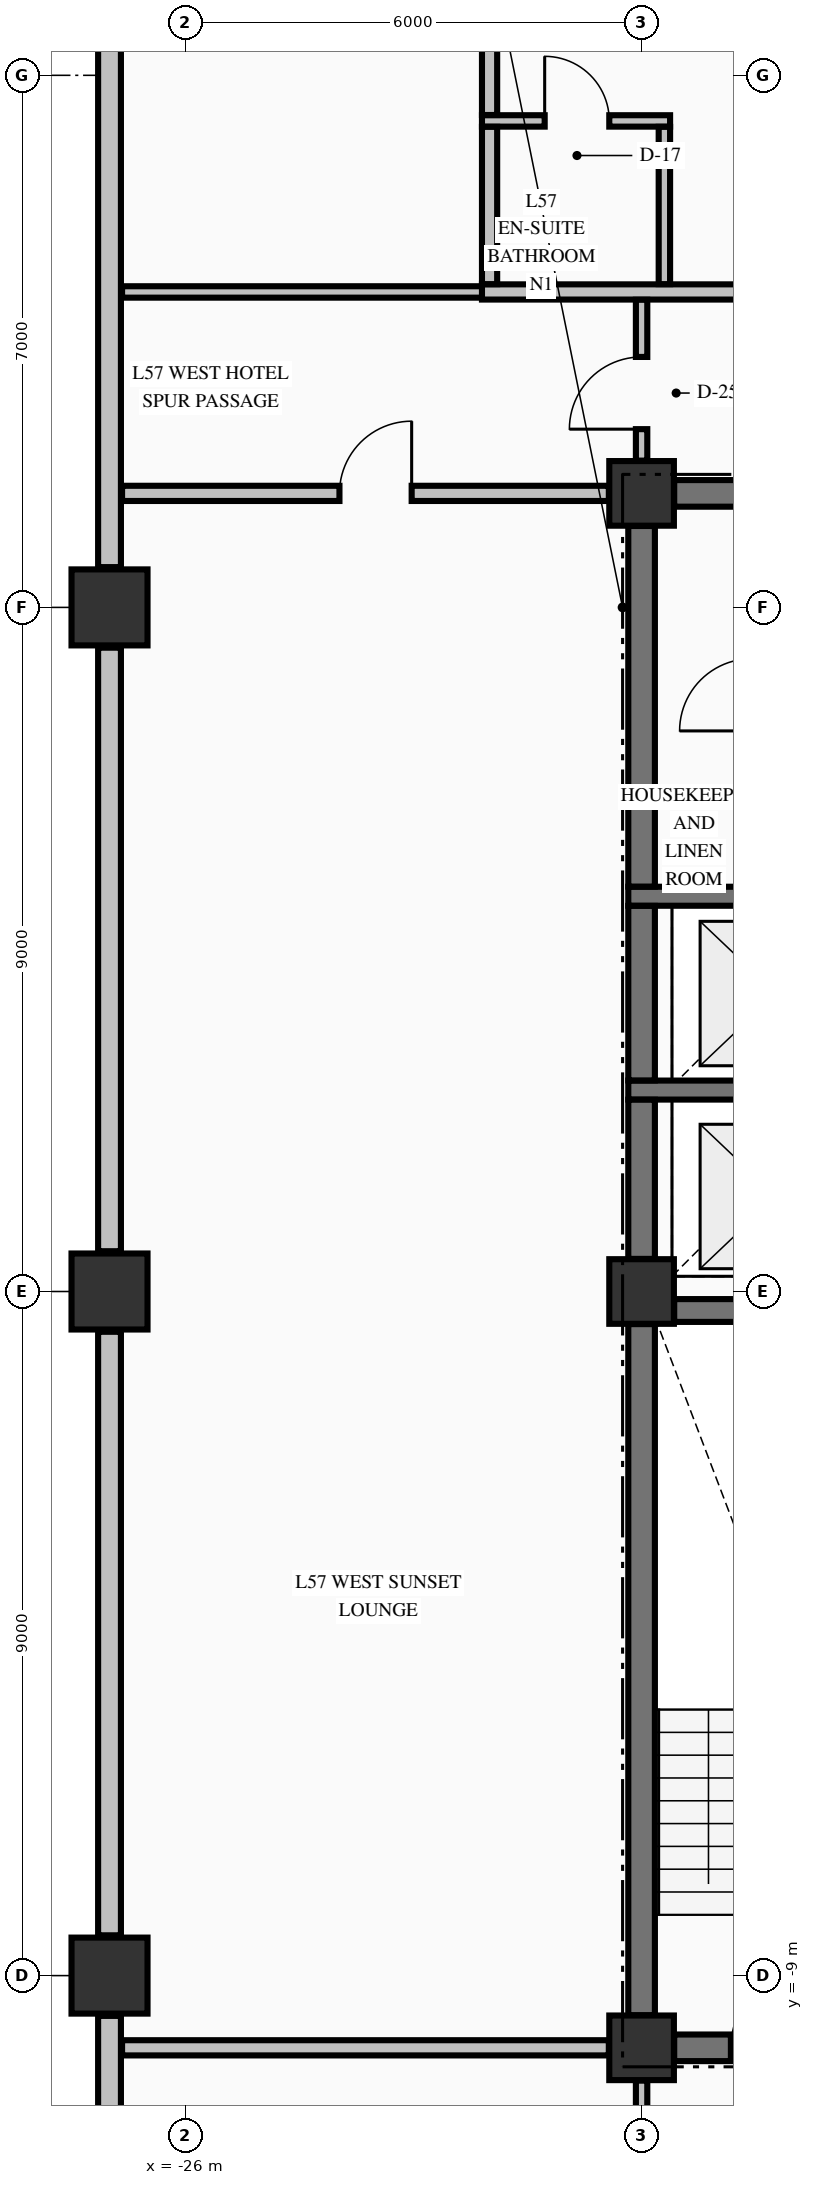
"""IFC4 building model, lengths in metres.
Left out: names, types, materials, properties, quantities, classifications, styles, units other than length and angle.
Written with IfcOpenShell. Run it as: python <this file> out.ifc"""

import sys

from ifc_helpers import new_model, si_unit, direction, frame, frame_2d, origin, origin_2d, place, context, subcontext, project, spatial, rectangle, extrude, element, fill, save


model = new_model("IFC4")
c1 = context("Model", 3, precision=1e-05, world=origin(), true_north=direction((0.0, 1.0)))
c2 = subcontext(c1, "Body", "Model", "MODEL_VIEW")
j1 = project(units=[si_unit("LENGTHUNIT", "METRE"), si_unit("PLANEANGLEUNIT", "RADIAN")], contexts=[c1])
p1 = place(None, origin())
s1 = spatial("IfcSite", under=j1, at=p1, CompositionType="ELEMENT")
p2 = place(p1, origin())
s2 = spatial("IfcBuilding", under=s1, at=p2, CompositionType="ELEMENT")
p3 = place(p2, frame((0.0, 0.0, 218.66)))
s3 = spatial("IfcBuildingStorey", under=s2, at=p3, CompositionType="ELEMENT", Elevation=218.66)
for number, where, z_axis, x_axis in (
    (1, (-27.0, -9.0, -0.25), (0.0, 0.0, 1.0), (1.0, 0.0, 0.0)),
    (2, (-27.0, 0.0, -0.25), (0.0, 0.0, 1.0), (1.0, 0.0, 0.0)),
    (3, (-27.0, 9.0, -0.25), (0.0, 0.0, 1.0), (1.0, 0.0, 0.0)),
):
    element("IfcColumn", number, at=place(p3, frame(where, z_axis=z_axis, x_axis=x_axis)), inside=s3, PredefinedType="COLUMN", context=c2, shape_type="SweptSolid", body=[
        extrude(rectangle(XDim=1.0, YDim=1.0, at=origin_2d()), origin(), (0.0, 0.0, 1.0), 3.225),
    ])
for number, where, z_axis, x_axis in (
    (4, (-20.0, -9.95, -0.25), (0.0, 0.0, 1.0), (1.0, 0.0, 0.0)),
    (5, (-20.0, 10.5, -0.25), (0.0, 0.0, 1.0), (1.0, 0.0, 0.0)),
    (6, (-20.0, 0.0, -0.25), (0.0, 0.0, 1.0), (1.0, 0.0, 0.0)),
):
    element("IfcColumn", number, at=place(p3, frame(where, z_axis=z_axis, x_axis=x_axis)), inside=s3, PredefinedType="COLUMN", context=c2, shape_type="SweptSolid", body=[
        extrude(rectangle(XDim=0.85, YDim=0.85, at=origin_2d()), origin(), (0.0, 0.0, 1.0), 3.225),
    ])
p4 = place(p3, frame((-27.0, -9.53, 0.0), z_axis=(0.0, 0.0, 1.0), x_axis=(0.0, -1.0, 0.0)))
e7 = element("IfcWall", 7, at=p4, inside=s3, PredefinedType="STANDARD", context=c2, shape_type="SweptSolid", body=[
    extrude(rectangle(XDim=9.44, YDim=0.3, at=frame_2d((4.72, 0.0))), origin(), (0.0, 0.0, 1.0), 2.367),
])
for number, where, z_axis, x_axis in (
    (8, (-27.0, -0.53, 0.0), (0.0, 0.0, 1.0), (0.0, -1.0, 0.0)),
    (9, (-27.0, 8.47, 0.0), (0.0, 0.0, 1.0), (0.0, -1.0, 0.0)),
):
    element("IfcWall", number, at=place(p3, frame(where, z_axis=z_axis, x_axis=x_axis)), inside=s3, PredefinedType="STANDARD", context=c2, shape_type="SweptSolid", body=[
        extrude(rectangle(XDim=7.94, YDim=0.3, at=frame_2d((3.97, 0.0))), origin(), (0.0, 0.0, 1.0), 2.367),
    ])
p5 = place(p3, frame((-27.0, 18.97, 0.0), z_axis=(0.0, 0.0, 1.0), x_axis=(0.0, -1.0, 0.0)))
e10 = element("IfcWall", 10, at=p5, inside=s3, PredefinedType="STANDARD", context=c2, shape_type="SweptSolid", body=[
    extrude(rectangle(XDim=9.44, YDim=0.3, at=frame_2d((4.72, 0.0))), origin(), (0.0, 0.0, 1.0), 2.367),
])
p6 = place(p3, frame((-19.571, -9.95, 0.0), z_axis=(0.0, 0.0, 1.0), x_axis=(1.0, 0.0, 0.0)))
e11 = element("IfcWall", 11, at=p6, inside=s3, PredefinedType="SHEAR", context=c2, shape_type="SweptSolid", body=[
    extrude(rectangle(XDim=4.871, YDim=0.35, at=frame_2d((2.436, 0.0))), origin(), (0.0, 0.0, 1.0), 2.975),
])
p7 = place(p6, frame((0.746, 0.0, 0.0)))
e12 = element("IfcOpeningElement", 12, at=p7, cuts=e11, PredefinedType="OPENING", context=c2, shape_type="SweptSolid", body=[
    extrude(rectangle(XDim=1.05, YDim=2.15, at=frame_2d((0.525, 1.075))), frame((0.0, 0.185, 0.0), z_axis=(0.0, -1.0, 0.0), x_axis=(1.0, 0.0, 0.0)), (0.0, 0.0, 1.0), 0.37),
])
p8 = place(p3, frame((-19.571, -0.25, 0.0), z_axis=(0.0, 0.0, 1.0), x_axis=(1.0, 0.0, 0.0)))
e13 = element("IfcWall", 13, at=p8, inside=s3, PredefinedType="SHEAR", context=c2, shape_type="SweptSolid", body=[
    extrude(rectangle(XDim=8.142, YDim=0.3, at=frame_2d((4.071, 0.0))), origin(), (0.0, 0.0, 1.0), 2.975),
])
p9 = place(p8, frame((5.871, 0.0, 0.0)))
e14 = element("IfcOpeningElement", 14, at=p9, cuts=e13, PredefinedType="OPENING", context=c2, shape_type="SweptSolid", body=[
    extrude(rectangle(XDim=1.1, YDim=2.15, at=frame_2d((0.55, 1.075))), frame((0.0, 0.16, 0.0), z_axis=(0.0, -1.0, 0.0), x_axis=(1.0, 0.0, 0.0)), (0.0, 0.0, 1.0), 0.32),
])
for number, where, z_axis, x_axis in (
    (15, (-20.175, 2.65, 0.0), (0.0, 0.0, 1.0), (1.0, 0.0, 0.0)),
    (16, (-20.175, 5.2, 0.0), (0.0, 0.0, 1.0), (1.0, 0.0, 0.0)),
):
    element("IfcWall", number, at=place(p3, frame(where, z_axis=z_axis, x_axis=x_axis)), inside=s3, PredefinedType="SOLIDWALL", context=c2, shape_type="SweptSolid", body=[
        extrude(rectangle(XDim=3.2, YDim=0.25, at=frame_2d((1.6, 0.0))), origin(), (0.0, 0.0, 1.0), 2.975),
    ])
p10 = place(p3, frame((-19.571, 10.5, 0.0), z_axis=(0.0, 0.0, 1.0), x_axis=(1.0, 0.0, 0.0)))
e17 = element("IfcWall", 17, at=p10, inside=s3, PredefinedType="SHEAR", context=c2, shape_type="SweptSolid", body=[
    extrude(rectangle(XDim=4.871, YDim=0.35, at=frame_2d((2.436, 0.0))), origin(), (0.0, 0.0, 1.0), 2.975),
])
p11 = place(p10, frame((3.121, 0.0, 0.0)))
e18 = element("IfcOpeningElement", 18, at=p11, cuts=e17, PredefinedType="OPENING", context=c2, shape_type="SweptSolid", body=[
    extrude(rectangle(XDim=0.95, YDim=2.02, at=frame_2d((0.475, 1.01))), frame((0.0, 0.185, 0.0), z_axis=(0.0, -1.0, 0.0), x_axis=(1.0, 0.0, 0.0)), (0.0, 0.0, 1.0), 0.37),
])
p12 = place(p10, frame((1.276, 0.0, 0.0)))
e19 = element("IfcOpeningElement", 19, at=p12, cuts=e17, PredefinedType="OPENING", context=c2, shape_type="SweptSolid", body=[
    extrude(rectangle(XDim=0.95, YDim=2.02, at=frame_2d((0.475, 1.01))), frame((0.0, 0.185, 0.0), z_axis=(0.0, -1.0, 0.0), x_axis=(1.0, 0.0, 0.0)), (0.0, 0.0, 1.0), 0.37),
])
p13 = place(p3, frame((-26.835, -9.95, 0.0), z_axis=(0.0, 0.0, 1.0), x_axis=(1.0, 0.0, 0.0)))
e20 = element("IfcWall", 20, at=p13, inside=s3, PredefinedType="PARTITIONING", context=c2, shape_type="SweptSolid", body=[
    extrude(rectangle(XDim=6.404, YDim=0.2, at=frame_2d((3.202, 0.0))), origin(), (0.0, 0.0, 1.0), 2.975),
])
p14 = place(p3, frame((-26.835, 10.5, 0.0), z_axis=(0.0, 0.0, 1.0), x_axis=(1.0, 0.0, 0.0)))
e21 = element("IfcWall", 21, at=p14, inside=s3, PredefinedType="PARTITIONING", context=c2, shape_type="SweptSolid", body=[
    extrude(rectangle(XDim=6.404, YDim=0.2, at=frame_2d((3.202, 0.0))), origin(), (0.0, 0.0, 1.0), 2.975),
])
p15 = place(p14, frame((2.86, 0.0, 0.0)))
e22 = element("IfcOpeningElement", 22, at=p15, cuts=e21, PredefinedType="OPENING", context=c2, shape_type="SweptSolid", body=[
    extrude(rectangle(XDim=0.95, YDim=2.15, at=frame_2d((0.475, 1.075))), frame((0.0, 0.11, 0.0), z_axis=(0.0, -1.0, 0.0), x_axis=(1.0, 0.0, 0.0)), (0.0, 0.0, 1.0), 0.22),
])
p16 = place(p3, frame((-26.835, 13.15, 0.0), z_axis=(0.0, 0.0, 1.0), x_axis=(1.0, 0.0, 0.0)))
e23 = element("IfcWall", 23, at=p16, inside=s3, PredefinedType="PARTITIONING", context=c2, shape_type="SweptSolid", body=[
    extrude(rectangle(XDim=4.935, YDim=0.15, at=frame_2d((2.468, 0.0))), origin(), (0.0, 0.0, 1.0), 2.975),
])
p17 = place(p3, frame((-22.1, 13.15, 0.0), z_axis=(0.0, 0.0, 1.0), x_axis=(1.0, 0.0, 0.0)))
e24 = element("IfcWall", 24, at=p17, inside=s3, PredefinedType="PARTITIONING", context=c2, shape_type="SweptSolid", body=[
    extrude(rectangle(XDim=39.2, YDim=0.2, at=frame_2d((19.6, 0.0))), origin(), (0.0, 0.0, 1.0), 2.975),
])
p18 = place(p17, frame((7.745, 0.0, 0.0)))
e25 = element("IfcOpeningElement", 25, at=p18, cuts=e24, PredefinedType="OPENING", context=c2, shape_type="SweptSolid", body=[
    extrude(rectangle(XDim=0.95, YDim=2.15, at=frame_2d((0.475, 1.075))), frame((0.0, 0.11, 0.0), z_axis=(0.0, -1.0, 0.0), x_axis=(1.0, 0.0, 0.0)), (0.0, 0.0, 1.0), 0.22),
])
p19 = place(p17, frame((17.525, 0.0, 0.0)))
e26 = element("IfcOpeningElement", 26, at=p19, cuts=e24, PredefinedType="OPENING", context=c2, shape_type="SweptSolid", body=[
    extrude(rectangle(XDim=0.95, YDim=2.15, at=frame_2d((0.475, 1.075))), frame((0.0, 0.11, 0.0), z_axis=(0.0, -1.0, 0.0), x_axis=(1.0, 0.0, 0.0)), (0.0, 0.0, 1.0), 0.22),
])
p20 = place(p17, frame((34.225, 0.0, 0.0)))
e27 = element("IfcOpeningElement", 27, at=p20, cuts=e24, PredefinedType="OPENING", context=c2, shape_type="SweptSolid", body=[
    extrude(rectangle(XDim=0.95, YDim=2.15, at=frame_2d((0.475, 1.075))), frame((0.0, 0.11, 0.0), z_axis=(0.0, -1.0, 0.0), x_axis=(1.0, 0.0, 0.0)), (0.0, 0.0, 1.0), 0.22),
])
p21 = place(p3, frame((-22.1, 15.4, 0.0), z_axis=(0.0, 0.0, 1.0), x_axis=(1.0, 0.0, 0.0)))
e28 = element("IfcWall", 28, at=p21, inside=s3, PredefinedType="PARTITIONING", context=c2, shape_type="SweptSolid", body=[
    extrude(rectangle(XDim=2.475, YDim=0.15, at=frame_2d((1.238, 0.0))), origin(), (0.0, 0.0, 1.0), 2.975),
])
p22 = place(p21, frame((0.825, 0.0, 0.0)))
e29 = element("IfcOpeningElement", 29, at=p22, cuts=e28, PredefinedType="OPENING", context=c2, shape_type="SweptSolid", body=[
    extrude(rectangle(XDim=0.85, YDim=2.1, at=frame_2d((0.425, 1.05))), frame((0.0, 0.085, 0.0), z_axis=(0.0, -1.0, 0.0), x_axis=(1.0, 0.0, 0.0)), (0.0, 0.0, 1.0), 0.17),
])
p23 = place(p3, frame((-20.0, -9.521, 0.0), z_axis=(0.0, 0.0, 1.0), x_axis=(0.0, 1.0, 0.0)))
e30 = element("IfcWall", 30, at=p23, inside=s3, PredefinedType="SHEAR", context=c2, shape_type="SweptSolid", body=[
    extrude(rectangle(XDim=9.092, YDim=0.35, at=frame_2d((4.546, 0.0))), origin(), (0.0, 0.0, 1.0), 2.975),
])
p24 = place(p3, frame((-20.0, 0.429, 0.0), z_axis=(0.0, 0.0, 1.0), x_axis=(0.0, 1.0, 0.0)))
e31 = element("IfcWall", 31, at=p24, inside=s3, PredefinedType="SHEAR", context=c2, shape_type="SweptSolid", body=[
    extrude(rectangle(XDim=2.094, YDim=0.35, at=frame_2d((1.047, 0.0))), origin(), (0.0, 0.0, 1.0), 2.975),
])
p25 = place(p3, frame((-20.0, 2.777, 0.0), z_axis=(0.0, 0.0, 1.0), x_axis=(0.0, 1.0, 0.0)))
e32 = element("IfcWall", 32, at=p25, inside=s3, PredefinedType="SHEAR", context=c2, shape_type="SweptSolid", body=[
    extrude(rectangle(XDim=2.296, YDim=0.35, at=frame_2d((1.148, 0.0))), origin(), (0.0, 0.0, 1.0), 2.975),
])
p26 = place(p3, frame((-20.0, 5.327, 0.0), z_axis=(0.0, 0.0, 1.0), x_axis=(0.0, 1.0, 0.0)))
e33 = element("IfcWall", 33, at=p26, inside=s3, PredefinedType="SHEAR", context=c2, shape_type="SweptSolid", body=[
    extrude(rectangle(XDim=4.744, YDim=0.35, at=frame_2d((2.372, 0.0))), origin(), (0.0, 0.0, 1.0), 2.975),
])
p27 = place(p3, frame((-22.0, 13.253, 0.0), z_axis=(0.0, 0.0, 1.0), x_axis=(0.0, 1.0, 0.0)))
e34 = element("IfcWall", 34, at=p27, inside=s3, PredefinedType="PARTITIONING", context=c2, shape_type="SweptSolid", body=[
    extrude(rectangle(XDim=2.069, YDim=0.2, at=frame_2d((1.035, 0.0))), origin(), (0.0, 0.0, 1.0), 2.975),
])
p28 = place(p3, frame((-22.0, 15.478, 0.0), z_axis=(0.0, 0.0, 1.0), x_axis=(0.0, 1.0, 0.0)))
e35 = element("IfcWall", 35, at=p28, inside=s3, PredefinedType="PARTITIONING", context=c2, shape_type="SweptSolid", body=[
    extrude(rectangle(XDim=3.516, YDim=0.2, at=frame_2d((1.758, 0.0))), origin(), (0.0, 0.0, 1.0), 2.975),
])
p29 = place(p3, frame((-20.0, -12.197, 0.0), z_axis=(0.0, 0.0, 1.0), x_axis=(0.0, 1.0, 0.0)))
e36 = element("IfcWall", 36, at=p29, inside=s3, PredefinedType="PARTITIONING", context=c2, shape_type="SweptSolid", body=[
    extrude(rectangle(XDim=1.816, YDim=0.15, at=frame_2d((0.908, 0.0))), origin(), (0.0, 0.0, 1.0), 2.167),
])
p30 = place(p3, frame((-20.0, 10.931, 0.0), z_axis=(0.0, 0.0, 1.0), x_axis=(0.0, 1.0, 0.0)))
e37 = element("IfcWall", 37, at=p30, inside=s3, PredefinedType="PARTITIONING", context=c2, shape_type="SweptSolid", body=[
    extrude(rectangle(XDim=2.116, YDim=0.15, at=frame_2d((1.058, 0.0))), origin(), (0.0, 0.0, 1.0), 2.167),
])
p31 = place(p30, frame((0.414, 0.0, 0.0)))
e38 = element("IfcOpeningElement", 38, at=p31, cuts=e37, PredefinedType="OPENING", context=c2, shape_type="SweptSolid", body=[
    extrude(rectangle(XDim=0.95, YDim=2.02, at=frame_2d((0.475, 1.01))), frame((0.0, 0.085, 0.0), z_axis=(0.0, -1.0, 0.0), x_axis=(1.0, 0.0, 0.0)), (0.0, 0.0, 1.0), 0.17),
])
p32 = place(p3, frame((-19.7, 13.253, 0.0), z_axis=(0.0, 0.0, 1.0), x_axis=(0.0, 1.0, 0.0)))
e39 = element("IfcWall", 39, at=p32, inside=s3, PredefinedType="PARTITIONING", context=c2, shape_type="SweptSolid", body=[
    extrude(rectangle(XDim=2.069, YDim=0.15, at=frame_2d((1.035, 0.0))), origin(), (0.0, 0.0, 1.0), 2.167),
])
p33 = place(p7, origin())
e40 = element("IfcDoor", 40, at=p33, inside=s3, OperationType="SINGLE_SWING_RIGHT", PredefinedType="DOOR", context=c2, shape_type="SweptSolid", body=[
    extrude(rectangle(XDim=1.05, YDim=2.15, at=frame_2d((0.525, 1.075))), frame((0.0, 0.025, 0.0), z_axis=(0.0, -1.0, 0.0), x_axis=(1.0, 0.0, 0.0)), (0.0, 0.0, 1.0), 0.05),
])
fill(e12, e40)
p34 = place(p22, origin())
e41 = element("IfcDoor", 41, at=p34, inside=s3, OperationType="SINGLE_SWING_LEFT", PredefinedType="DOOR", context=c2, shape_type="SweptSolid", body=[
    extrude(rectangle(XDim=0.85, YDim=2.1, at=frame_2d((0.425, 1.05))), frame((0.0, 0.025, 0.0), z_axis=(0.0, -1.0, 0.0), x_axis=(1.0, 0.0, 0.0)), (0.0, 0.0, 1.0), 0.05),
])
fill(e29, e41)
p35 = place(p31, origin())
e42 = element("IfcDoor", 42, at=p35, inside=s3, OperationType="SINGLE_SWING_LEFT", PredefinedType="DOOR", context=c2, shape_type="SweptSolid", body=[
    extrude(rectangle(XDim=0.95, YDim=2.02, at=frame_2d((0.475, 1.01))), frame((0.0, 0.025, 0.0), z_axis=(0.0, -1.0, 0.0), x_axis=(1.0, 0.0, 0.0)), (0.0, 0.0, 1.0), 0.05),
])
fill(e38, e42)
p36 = place(p15, origin())
e43 = element("IfcDoor", 43, at=p36, inside=s3, OperationType="SINGLE_SWING_RIGHT", PredefinedType="DOOR", context=c2, shape_type="SweptSolid", body=[
    extrude(rectangle(XDim=0.95, YDim=2.15, at=frame_2d((0.475, 1.075))), frame((0.0, 0.025, 0.0), z_axis=(0.0, -1.0, 0.0), x_axis=(1.0, 0.0, 0.0)), (0.0, 0.0, 1.0), 0.05),
])
fill(e22, e43)
save(model, sys.argv[1])
